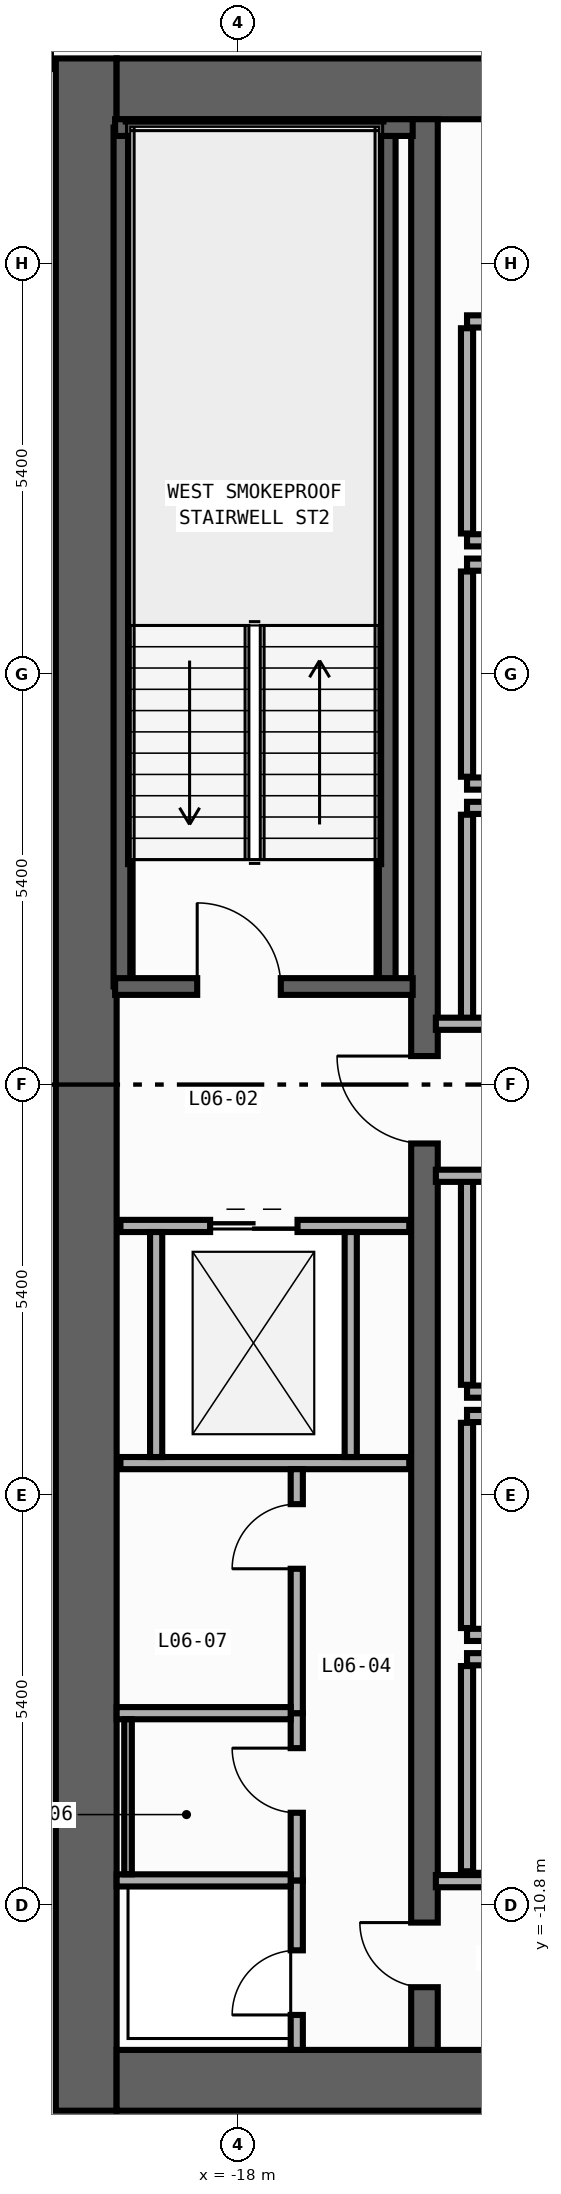
"""IFC4 building model, lengths in metres.
Left out: names, types, materials, properties, quantities, classifications, styles, units other than length and angle.
Written with IfcOpenShell. Run it as: python <this file> out.ifc"""

import sys

from ifc_helpers import new_model, si_unit, direction, frame, frame_2d, origin, place, context, subcontext, project, spatial, rectangle, extrude, element, fill, save


model = new_model("IFC4")
c1 = context("Model", 3, precision=1e-05, world=origin(), true_north=direction((0.0, 1.0)))
c2 = subcontext(c1, "Body", "Model", "MODEL_VIEW")
j1 = project(units=[si_unit("LENGTHUNIT", "METRE"), si_unit("PLANEANGLEUNIT", "RADIAN")], contexts=[c1])
p1 = place(None, origin())
s1 = spatial("IfcSite", under=j1, at=p1, CompositionType="ELEMENT")
p2 = place(p1, origin())
s2 = spatial("IfcBuilding", under=s1, at=p2, CompositionType="ELEMENT")
p3 = place(p2, frame((0.0, 0.0, 26.0)))
s3 = spatial("IfcBuildingStorey", under=s2, at=p3, CompositionType="ELEMENT", Elevation=26.0)
p4 = place(p3, frame((-20.0, -13.5, 0.0), z_axis=(0.0, 0.0, 1.0), x_axis=(0.0, 1.0, 0.0)))
e1 = element("IfcWall", 1, at=p4, inside=s3, PredefinedType="SHEAR", context=c2, shape_type="SweptSolid", body=[
    extrude(rectangle(XDim=27.0, YDim=0.8, at=frame_2d((13.5, 0.0))), origin(), (0.0, 0.0, 1.0), 3.94),
])
for number, where, z_axis, x_axis in (
    (2, (-19.6, -13.1, 0.0), (0.0, 0.0, 1.0), (1.0, 0.0, 0.0)),
    (3, (-19.6, 13.1, 0.0), (0.0, 0.0, 1.0), (1.0, 0.0, 0.0)),
):
    element("IfcWall", number, at=place(p3, frame(where, z_axis=z_axis, x_axis=x_axis)), inside=s3, PredefinedType="SHEAR", context=c2, shape_type="SweptSolid", body=[
        extrude(rectangle(XDim=6.8, YDim=0.8, at=frame_2d((3.4, 0.0))), origin(), (0.0, 0.0, 1.0), 3.94),
    ])
p5 = place(p3, frame((-15.55, -12.7, 0.0), z_axis=(0.0, 0.0, 1.0), x_axis=(0.0, 1.0, 0.0)))
e4 = element("IfcWall", 4, at=p5, inside=s3, PredefinedType="SHEAR", context=c2, shape_type="SweptSolid", body=[
    extrude(rectangle(XDim=25.4, YDim=0.35, at=frame_2d((12.7, 0.0))), origin(), (0.0, 0.0, 1.0), 3.94),
])
p6 = place(p5, frame((11.925, 0.0, 0.0)))
e5 = element("IfcOpeningElement", 5, at=p6, cuts=e4, PredefinedType="OPENING", context=c2, shape_type="SweptSolid", body=[
    extrude(rectangle(XDim=1.15, YDim=2.2, at=frame_2d((0.575, 1.1))), frame((0.0, 0.185, 0.0), z_axis=(0.0, -1.0, 0.0), x_axis=(1.0, 0.0, 0.0)), (0.0, 0.0, 1.0), 0.37),
])
p7 = place(p5, frame((0.825, 0.0, 0.0)))
e6 = element("IfcOpeningElement", 6, at=p7, cuts=e4, PredefinedType="OPENING", context=c2, shape_type="SweptSolid", body=[
    extrude(rectangle(XDim=0.85, YDim=2.1, at=frame_2d((0.425, 1.05))), frame((0.0, 0.185, 0.0), z_axis=(0.0, -1.0, 0.0), x_axis=(1.0, 0.0, 0.0)), (0.0, 0.0, 1.0), 0.37),
])
for number, where, z_axis, x_axis in (
    (7, (-16.04, 1.29, 0.0), (0.0, 0.0, 1.0), (0.0, 1.0, 0.0)),
    (8, (-19.53, 1.29, 0.0), (0.0, 0.0, 1.0), (0.0, 1.0, 0.0)),
):
    element("IfcWall", number, at=place(p3, frame(where, z_axis=z_axis, x_axis=x_axis)), inside=s3, PredefinedType="SHEAR", context=c2, shape_type="SweptSolid", body=[
        extrude(rectangle(XDim=11.3, YDim=0.22, at=frame_2d((5.65, 0.0))), origin(), (0.0, 0.0, 1.0), 3.94),
    ])
p8 = place(p3, frame((-19.62, 12.59, 0.0), z_axis=(0.0, 0.0, 1.0), x_axis=(1.0, 0.0, 0.0)))
e9 = element("IfcWall", 9, at=p8, inside=s3, PredefinedType="SHEAR", context=c2, shape_type="SweptSolid", body=[
    extrude(rectangle(XDim=3.915, YDim=0.22, at=frame_2d((1.958, 0.0))), origin(), (0.0, 0.0, 1.0), 3.94),
])
p9 = place(p3, frame((-19.62, 1.29, 0.0), z_axis=(0.0, 0.0, 1.0), x_axis=(1.0, 0.0, 0.0)))
e10 = element("IfcWall", 10, at=p9, inside=s3, PredefinedType="SHEAR", context=c2, shape_type="SweptSolid", body=[
    extrude(rectangle(XDim=3.915, YDim=0.22, at=frame_2d((1.958, 0.0))), origin(), (0.0, 0.0, 1.0), 3.94),
])
p10 = place(p9, frame((1.08, 0.0, 0.0)))
e11 = element("IfcOpeningElement", 11, at=p10, cuts=e10, PredefinedType="OPENING", context=c2, shape_type="SweptSolid", body=[
    extrude(rectangle(XDim=1.1, YDim=2.2, at=frame_2d((0.55, 1.1))), frame((0.0, 0.12, 0.0), z_axis=(0.0, -1.0, 0.0), x_axis=(1.0, 0.0, 0.0)), (0.0, 0.0, 1.0), 0.24),
])
for number, where, z_axis, x_axis in (
    (12, (-14.99, 7.16, 0.0), (0.0, 0.0, 1.0), (1.0, 0.0, 0.0)),
    (13, (-14.99, 10.04, 0.0), (0.0, 0.0, 1.0), (1.0, 0.0, 0.0)),
):
    element("IfcWall", number, at=place(p3, frame(where, z_axis=z_axis, x_axis=x_axis)), inside=s3, PredefinedType="STANDARD", context=c2, shape_type="SweptSolid", body=[
        extrude(rectangle(XDim=2.19, YDim=0.16, at=frame_2d((1.095, 0.0))), origin(), (0.0, 0.0, 1.0), 3.94),
    ])
p11 = place(p3, frame((-14.99, 7.25, 0.0), z_axis=(0.0, 0.0, 1.0), x_axis=(0.0, 1.0, 0.0)))
e14 = element("IfcWall", 14, at=p11, inside=s3, PredefinedType="STANDARD", context=c2, shape_type="SweptSolid", body=[
    extrude(rectangle(XDim=2.7, YDim=0.16, at=frame_2d((1.35, 0.0))), origin(), (0.0, 0.0, 1.0), 3.94),
])
for number, where, z_axis, x_axis in (
    (15, (-14.99, 3.96, 0.0), (0.0, 0.0, 1.0), (1.0, 0.0, 0.0)),
    (16, (-14.99, 6.84, 0.0), (0.0, 0.0, 1.0), (1.0, 0.0, 0.0)),
):
    element("IfcWall", number, at=place(p3, frame(where, z_axis=z_axis, x_axis=x_axis)), inside=s3, PredefinedType="STANDARD", context=c2, shape_type="SweptSolid", body=[
        extrude(rectangle(XDim=2.19, YDim=0.16, at=frame_2d((1.095, 0.0))), origin(), (0.0, 0.0, 1.0), 3.94),
    ])
p12 = place(p3, frame((-14.99, 4.05, 0.0), z_axis=(0.0, 0.0, 1.0), x_axis=(0.0, 1.0, 0.0)))
e17 = element("IfcWall", 17, at=p12, inside=s3, PredefinedType="STANDARD", context=c2, shape_type="SweptSolid", body=[
    extrude(rectangle(XDim=2.7, YDim=0.16, at=frame_2d((1.35, 0.0))), origin(), (0.0, 0.0, 1.0), 3.94),
])
p13 = place(p3, frame((-14.99, 3.64, 0.0), z_axis=(0.0, 0.0, 1.0), x_axis=(1.0, 0.0, 0.0)))
e18 = element("IfcWall", 18, at=p13, inside=s3, PredefinedType="STANDARD", context=c2, shape_type="SweptSolid", body=[
    extrude(rectangle(XDim=2.19, YDim=0.16, at=frame_2d((1.095, 0.0))), origin(), (0.0, 0.0, 1.0), 3.94),
])
p14 = place(p3, frame((-14.99, 0.85, 0.0), z_axis=(0.0, 0.0, 1.0), x_axis=(0.0, 1.0, 0.0)))
e19 = element("IfcWall", 19, at=p14, inside=s3, PredefinedType="STANDARD", context=c2, shape_type="SweptSolid", body=[
    extrude(rectangle(XDim=2.7, YDim=0.16, at=frame_2d((1.35, 0.0))), origin(), (0.0, 0.0, 1.0), 3.94),
])
p15 = place(p3, frame((-14.99, -4.04, 0.0), z_axis=(0.0, 0.0, 1.0), x_axis=(1.0, 0.0, 0.0)))
e20 = element("IfcWall", 20, at=p15, inside=s3, PredefinedType="STANDARD", context=c2, shape_type="SweptSolid", body=[
    extrude(rectangle(XDim=2.19, YDim=0.16, at=frame_2d((1.095, 0.0))), origin(), (0.0, 0.0, 1.0), 3.94),
])
p16 = place(p3, frame((-14.99, -3.95, 0.0), z_axis=(0.0, 0.0, 1.0), x_axis=(0.0, 1.0, 0.0)))
e21 = element("IfcWall", 21, at=p16, inside=s3, PredefinedType="STANDARD", context=c2, shape_type="SweptSolid", body=[
    extrude(rectangle(XDim=2.7, YDim=0.16, at=frame_2d((1.35, 0.0))), origin(), (0.0, 0.0, 1.0), 3.94),
])
for number, where, z_axis, x_axis in (
    (22, (-14.99, -7.24, 0.0), (0.0, 0.0, 1.0), (1.0, 0.0, 0.0)),
    (23, (-14.99, -4.36, 0.0), (0.0, 0.0, 1.0), (1.0, 0.0, 0.0)),
):
    element("IfcWall", number, at=place(p3, frame(where, z_axis=z_axis, x_axis=x_axis)), inside=s3, PredefinedType="STANDARD", context=c2, shape_type="SweptSolid", body=[
        extrude(rectangle(XDim=2.19, YDim=0.16, at=frame_2d((1.095, 0.0))), origin(), (0.0, 0.0, 1.0), 3.94),
    ])
p17 = place(p3, frame((-14.99, -7.15, 0.0), z_axis=(0.0, 0.0, 1.0), x_axis=(0.0, 1.0, 0.0)))
e24 = element("IfcWall", 24, at=p17, inside=s3, PredefinedType="STANDARD", context=c2, shape_type="SweptSolid", body=[
    extrude(rectangle(XDim=2.7, YDim=0.16, at=frame_2d((1.35, 0.0))), origin(), (0.0, 0.0, 1.0), 3.94),
])
p18 = place(p3, frame((-14.99, -7.56, 0.0), z_axis=(0.0, 0.0, 1.0), x_axis=(1.0, 0.0, 0.0)))
e25 = element("IfcWall", 25, at=p18, inside=s3, PredefinedType="STANDARD", context=c2, shape_type="SweptSolid", body=[
    extrude(rectangle(XDim=2.19, YDim=0.16, at=frame_2d((1.095, 0.0))), origin(), (0.0, 0.0, 1.0), 3.94),
])
p19 = place(p3, frame((-14.99, -10.35, 0.0), z_axis=(0.0, 0.0, 1.0), x_axis=(0.0, 1.0, 0.0)))
e26 = element("IfcWall", 26, at=p19, inside=s3, PredefinedType="STANDARD", context=c2, shape_type="SweptSolid", body=[
    extrude(rectangle(XDim=2.7, YDim=0.16, at=frame_2d((1.35, 0.0))), origin(), (0.0, 0.0, 1.0), 3.94),
])
p20 = place(p3, frame((-19.55, -1.86, 0.0), z_axis=(0.0, 0.0, 1.0), x_axis=(1.0, 0.0, 0.0)))
e27 = element("IfcWall", 27, at=p20, inside=s3, PredefinedType="STANDARD", context=c2, shape_type="SweptSolid", body=[
    extrude(rectangle(XDim=3.8, YDim=0.16, at=frame_2d((1.9, 0.0))), origin(), (0.0, 0.0, 1.0), 3.94),
])
p21 = place(p20, frame((1.18, 0.0, 0.0)))
e28 = element("IfcOpeningElement", 28, at=p21, cuts=e27, PredefinedType="OPENING", context=c2, shape_type="SweptSolid", body=[
    extrude(rectangle(XDim=1.15, YDim=2.2, at=frame_2d((0.575, 1.1))), frame((0.0, 0.09, 0.0), z_axis=(0.0, -1.0, 0.0), x_axis=(1.0, 0.0, 0.0)), (0.0, 0.0, 1.0), 0.18),
])
p22 = place(p3, frame((-19.55, -4.98, 0.0), z_axis=(0.0, 0.0, 1.0), x_axis=(1.0, 0.0, 0.0)))
e29 = element("IfcWall", 29, at=p22, inside=s3, PredefinedType="STANDARD", context=c2, shape_type="SweptSolid", body=[
    extrude(rectangle(XDim=3.8, YDim=0.16, at=frame_2d((1.9, 0.0))), origin(), (0.0, 0.0, 1.0), 3.94),
])
for number, where, z_axis, x_axis in (
    (30, (-19.08, -4.9, 0.0), (0.0, 0.0, 1.0), (0.0, 1.0, 0.0)),
    (31, (-16.52, -4.9, 0.0), (0.0, 0.0, 1.0), (0.0, 1.0, 0.0)),
):
    element("IfcWall", number, at=place(p3, frame(where, z_axis=z_axis, x_axis=x_axis)), inside=s3, PredefinedType="STANDARD", context=c2, shape_type="SweptSolid", body=[
        extrude(rectangle(XDim=2.96, YDim=0.16, at=frame_2d((1.48, 0.0))), origin(), (0.0, 0.0, 1.0), 3.94),
    ])
for number, where, z_axis, x_axis in (
    (32, (-15.4, 0.8, 0.0), (0.0, 0.0, 1.0), (1.0, 0.0, 0.0)),
    (33, (-15.4, -1.2, 0.0), (0.0, 0.0, 1.0), (1.0, 0.0, 0.0)),
    (34, (-15.4, -10.48, 0.0), (0.0, 0.0, 1.0), (1.0, 0.0, 0.0)),
):
    element("IfcWall", number, at=place(p3, frame(where, z_axis=z_axis, x_axis=x_axis)), inside=s3, PredefinedType="STANDARD", context=c2, shape_type="SweptSolid", body=[
        extrude(rectangle(XDim=2.6, YDim=0.16, at=frame_2d((1.3, 0.0))), origin(), (0.0, 0.0, 1.0), 3.94),
    ])
p23 = place(p3, frame((-17.23, -12.7, 0.0), z_axis=(0.0, 0.0, 1.0), x_axis=(0.0, 1.0, 0.0)))
e35 = element("IfcWall", 35, at=p23, inside=s3, PredefinedType="PARTITIONING", context=c2, shape_type="SweptSolid", body=[
    extrude(rectangle(XDim=2.23, YDim=0.16, at=frame_2d((1.115, 0.0))), origin(), (0.0, 0.0, 1.0), 3.94),
])
p24 = place(p23, frame((0.46, 0.0, 0.0)))
e36 = element("IfcOpeningElement", 36, at=p24, cuts=e35, PredefinedType="OPENING", context=c2, shape_type="SweptSolid", body=[
    extrude(rectangle(XDim=0.85, YDim=2.1, at=frame_2d((0.425, 1.05))), frame((0.0, 0.09, 0.0), z_axis=(0.0, -1.0, 0.0), x_axis=(1.0, 0.0, 0.0)), (0.0, 0.0, 1.0), 0.18),
])
p25 = place(p3, frame((-17.23, -10.47, 0.0), z_axis=(0.0, 0.0, 1.0), x_axis=(0.0, 1.0, 0.0)))
e37 = element("IfcWall", 37, at=p25, inside=s3, PredefinedType="PARTITIONING", context=c2, shape_type="SweptSolid", body=[
    extrude(rectangle(XDim=2.2, YDim=0.16, at=frame_2d((1.1, 0.0))), origin(), (0.0, 0.0, 1.0), 3.94),
])
p26 = place(p25, frame((0.89, 0.0, 0.0)))
e38 = element("IfcOpeningElement", 38, at=p26, cuts=e37, PredefinedType="OPENING", context=c2, shape_type="SweptSolid", body=[
    extrude(rectangle(XDim=0.85, YDim=2.1, at=frame_2d((0.425, 1.05))), frame((0.0, 0.09, 0.0), z_axis=(0.0, -1.0, 0.0), x_axis=(1.0, 0.0, 0.0)), (0.0, 0.0, 1.0), 0.18),
])
p27 = place(p3, frame((-17.23, -8.27, 0.0), z_axis=(0.0, 0.0, 1.0), x_axis=(0.0, 1.0, 0.0)))
e39 = element("IfcWall", 39, at=p27, inside=s3, PredefinedType="PARTITIONING", context=c2, shape_type="SweptSolid", body=[
    extrude(rectangle(XDim=3.21, YDim=0.16, at=frame_2d((1.605, 0.0))), origin(), (0.0, 0.0, 1.0), 3.94),
])
p28 = place(p27, frame((1.9, 0.0, 0.0)))
e40 = element("IfcOpeningElement", 40, at=p28, cuts=e39, PredefinedType="OPENING", context=c2, shape_type="SweptSolid", body=[
    extrude(rectangle(XDim=0.85, YDim=2.1, at=frame_2d((0.425, 1.05))), frame((0.0, 0.09, 0.0), z_axis=(0.0, -1.0, 0.0), x_axis=(1.0, 0.0, 0.0)), (0.0, 0.0, 1.0), 0.18),
])
for number, where, z_axis, x_axis in (
    (41, (-19.6, -10.47, 0.0), (0.0, 0.0, 1.0), (1.0, 0.0, 0.0)),
    (42, (-19.6, -8.27, 0.0), (0.0, 0.0, 1.0), (1.0, 0.0, 0.0)),
):
    element("IfcWall", number, at=place(p3, frame(where, z_axis=z_axis, x_axis=x_axis)), inside=s3, PredefinedType="PARTITIONING", context=c2, shape_type="SweptSolid", body=[
        extrude(rectangle(XDim=2.29, YDim=0.16, at=frame_2d((1.145, 0.0))), origin(), (0.0, 0.0, 1.0), 3.94),
    ])
p29 = place(p3, frame((-19.45, -10.39, 0.0), z_axis=(0.0, 0.0, 1.0), x_axis=(0.0, 1.0, 0.0)))
e43 = element("IfcWall", 43, at=p29, inside=s3, PredefinedType="PARTITIONING", context=c2, shape_type="SweptSolid", body=[
    extrude(rectangle(XDim=2.04, YDim=0.1, at=frame_2d((1.02, 0.0))), origin(), (0.0, 0.0, 1.0), 3.94),
])
p30 = place(p10, origin())
e44 = element("IfcDoor", 44, at=p30, inside=s3, OperationType="SINGLE_SWING_LEFT", PredefinedType="DOOR", context=c2, shape_type="SweptSolid", body=[
    extrude(rectangle(XDim=1.1, YDim=2.2, at=frame_2d((0.55, 1.1))), frame((0.0, 0.025, 0.0), z_axis=(0.0, -1.0, 0.0), x_axis=(1.0, 0.0, 0.0)), (0.0, 0.0, 1.0), 0.05),
])
fill(e11, e44)
p31 = place(p6, origin())
e45 = element("IfcDoor", 45, at=p31, inside=s3, OperationType="SINGLE_SWING_RIGHT", PredefinedType="DOOR", context=c2, shape_type="SweptSolid", body=[
    extrude(rectangle(XDim=1.15, YDim=2.2, at=frame_2d((0.575, 1.1))), frame((0.0, 0.025, 0.0), z_axis=(0.0, -1.0, 0.0), x_axis=(1.0, 0.0, 0.0)), (0.0, 0.0, 1.0), 0.05),
])
fill(e5, e45)
p32 = place(p7, origin())
e46 = element("IfcDoor", 46, at=p32, inside=s3, OperationType="SINGLE_SWING_RIGHT", PredefinedType="DOOR", context=c2, shape_type="SweptSolid", body=[
    extrude(rectangle(XDim=0.85, YDim=2.1, at=frame_2d((0.425, 1.05))), frame((0.0, 0.025, 0.0), z_axis=(0.0, -1.0, 0.0), x_axis=(1.0, 0.0, 0.0)), (0.0, 0.0, 1.0), 0.05),
])
fill(e6, e46)
p33 = place(p21, origin())
e47 = element("IfcDoor", 47, at=p33, inside=s3, OperationType="DOUBLE_DOOR_SLIDING", PredefinedType="DOOR", context=c2, shape_type="SweptSolid", body=[
    extrude(rectangle(XDim=1.15, YDim=2.2, at=frame_2d((0.575, 1.1))), frame((0.0, 0.025, 0.0), z_axis=(0.0, -1.0, 0.0), x_axis=(1.0, 0.0, 0.0)), (0.0, 0.0, 1.0), 0.05),
])
fill(e28, e47)
p34 = place(p24, origin())
e48 = element("IfcDoor", 48, at=p34, inside=s3, OperationType="SINGLE_SWING_LEFT", PredefinedType="DOOR", context=c2, shape_type="SweptSolid", body=[
    extrude(rectangle(XDim=0.85, YDim=2.1, at=frame_2d((0.425, 1.05))), frame((0.0, 0.025, 0.0), z_axis=(0.0, -1.0, 0.0), x_axis=(1.0, 0.0, 0.0)), (0.0, 0.0, 1.0), 0.05),
])
fill(e36, e48)
p35 = place(p26, origin())
e49 = element("IfcDoor", 49, at=p35, inside=s3, OperationType="SINGLE_SWING_RIGHT", PredefinedType="DOOR", context=c2, shape_type="SweptSolid", body=[
    extrude(rectangle(XDim=0.85, YDim=2.1, at=frame_2d((0.425, 1.05))), frame((0.0, 0.025, 0.0), z_axis=(0.0, -1.0, 0.0), x_axis=(1.0, 0.0, 0.0)), (0.0, 0.0, 1.0), 0.05),
])
fill(e38, e49)
p36 = place(p28, origin())
e50 = element("IfcDoor", 50, at=p36, inside=s3, OperationType="SINGLE_SWING_LEFT", PredefinedType="DOOR", context=c2, shape_type="SweptSolid", body=[
    extrude(rectangle(XDim=0.85, YDim=2.1, at=frame_2d((0.425, 1.05))), frame((0.0, 0.025, 0.0), z_axis=(0.0, -1.0, 0.0), x_axis=(1.0, 0.0, 0.0)), (0.0, 0.0, 1.0), 0.05),
])
fill(e40, e50)
save(model, sys.argv[1])
